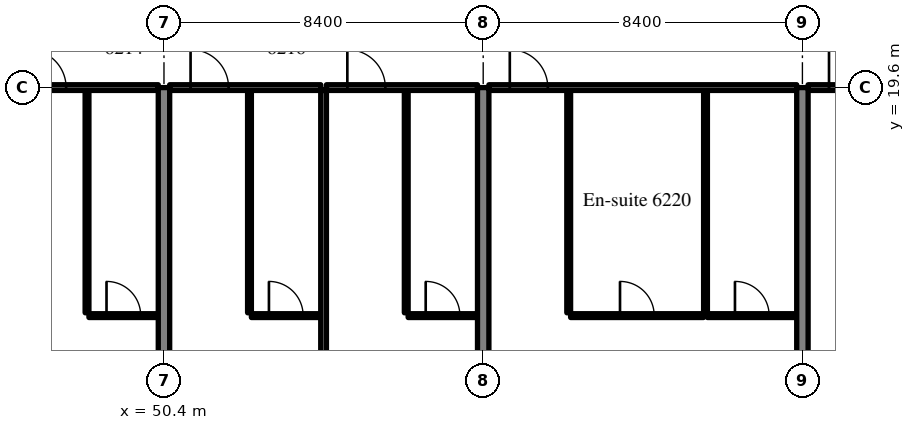
"""IFC4 building model, lengths in metres.
Left out: names, types, materials, properties, quantities, classifications, styles, units other than length and angle.
Written with IfcOpenShell. Run it as: python <this file> out.ifc"""

import sys

from ifc_helpers import new_model, si_unit, direction, frame, frame_2d, origin, place, context, subcontext, project, spatial, rectangle, extrude, source, transform, mapped, element, fill, save


model = new_model("IFC4")
c1 = context("Model", 3, precision=1e-05, world=origin(), true_north=direction((0.0, 1.0)))
c2 = subcontext(c1, "Body", "Model", "MODEL_VIEW")
j1 = project(units=[si_unit("LENGTHUNIT", "METRE"), si_unit("PLANEANGLEUNIT", "RADIAN")], contexts=[c1])
p1 = place(None, origin())
s1 = spatial("IfcSite", under=j1, at=p1, CompositionType="ELEMENT")
p2 = place(p1, origin())
s2 = spatial("IfcBuilding", under=s1, at=p2, CompositionType="ELEMENT")
p3 = place(p2, frame((0.0, 0.0, 256.9)))
s3 = spatial("IfcBuildingStorey", under=s2, at=p3, CompositionType="ELEMENT", Elevation=256.9)
m1 = source(origin(), c2, "Body", "SweptSolid", [
    extrude(rectangle(XDim=13.1, YDim=0.3, at=frame_2d((6.55, 0.0))), origin(), (0.0, 0.0, 1.0), 3.62),
])
p4 = place(p3, frame((50.4, 6.5, 0.0), z_axis=(0.0, 0.0, 1.0), x_axis=(0.0, 1.0, 0.0)))
e1 = element("IfcWall", 1, at=p4, inside=s3, PredefinedType="SHEAR", context=c2, shape_type="MappedRepresentation", body=[
    mapped(m1, transform((0.0, 0.0, 0.0), scale=1.0)),
])
m2 = source(origin(), c2, "Body", "SweptSolid", [
    extrude(rectangle(XDim=14.1, YDim=0.3, at=frame_2d((7.05, 0.0))), origin(), (0.0, 0.0, 1.0), 3.62),
])
for number, where, z_axis, x_axis in (
    (2, (58.8, 5.5, 0.0), (0.0, 0.0, 1.0), (0.0, 1.0, 0.0)),
    (3, (67.2, 5.5, 0.0), (0.0, 0.0, 1.0), (0.0, 1.0, 0.0)),
):
    element("IfcWall", number, at=place(p3, frame(where, z_axis=z_axis, x_axis=x_axis)), inside=s3, PredefinedType="SHEAR", context=c2, shape_type="MappedRepresentation", body=[
        mapped(m2, transform((0.0, 0.0, 0.0), scale=1.0)),
    ])
m3 = source(origin(), c2, "Body", "SweptSolid", [
    extrude(rectangle(XDim=5.85, YDim=0.1, at=frame_2d((2.925, 0.0))), origin(), (0.0, 0.0, 1.0), 3.62),
])
p5 = place(p3, frame((48.375, 13.675, 0.0), z_axis=(0.0, 0.0, 1.0), x_axis=(0.0, 1.0, 0.0)))
e4 = element("IfcWall", 4, at=p5, inside=s3, PredefinedType="PARTITIONING", context=c2, shape_type="MappedRepresentation", body=[
    mapped(m3, transform((0.0, 0.0, 0.0), scale=1.0)),
])
m4 = source(origin(), c2, "Body", "SweptSolid", [
    extrude(rectangle(XDim=1.825, YDim=0.1, at=frame_2d((0.913, 0.0))), origin(), (0.0, 0.0, 1.0), 3.62),
])
p6 = place(p3, frame((48.425, 13.6, 0.0), z_axis=(0.0, 0.0, 1.0), x_axis=(1.0, 0.0, 0.0)))
e5 = element("IfcWall", 5, at=p6, inside=s3, PredefinedType="PARTITIONING", context=c2, shape_type="MappedRepresentation", body=[
    mapped(m4, transform((0.0, 0.0, 0.0), scale=1.0)),
])
m5 = source(origin(), c2, "Body", "SweptSolid", [
    extrude(rectangle(XDim=0.9, YDim=2.1, at=frame_2d((0.45, 1.05))), frame((0.0, 0.06, 0.0), z_axis=(0.0, -1.0, 0.0), x_axis=(1.0, 0.0, 0.0)), (0.0, 0.0, 1.0), 0.12),
])
p7 = place(p6, frame((0.463, 0.0, 0.0)))
e6 = element("IfcOpeningElement", 6, at=p7, cuts=e5, PredefinedType="OPENING", context=c2, shape_type="MappedRepresentation", body=[
    mapped(m5, transform((0.0, 0.0, 0.0), scale=1.0)),
])
m6 = source(origin(), c2, "Body", "SweptSolid", [
    extrude(rectangle(XDim=3.975, YDim=0.15, at=frame_2d((1.988, 0.0))), origin(), (0.0, 0.0, 1.0), 2.92),
])
p8 = place(p3, frame((46.275, 19.6, 0.0), z_axis=(0.0, 0.0, 1.0), x_axis=(1.0, 0.0, 0.0)))
e7 = element("IfcWall", 7, at=p8, inside=s3, PredefinedType="PARTITIONING", context=c2, shape_type="MappedRepresentation", body=[
    mapped(m6, transform((0.0, 0.0, 0.0), scale=1.0)),
])
m7 = source(origin(), c2, "Body", "SweptSolid", [
    extrude(rectangle(XDim=1.0, YDim=2.1, at=frame_2d((0.5, 1.05))), frame((0.0, 0.085, 0.0), z_axis=(0.0, -1.0, 0.0), x_axis=(1.0, 0.0, 0.0)), (0.0, 0.0, 1.0), 0.17),
])
p9 = place(p8, frame((0.55, 0.0, 0.0)))
e8 = element("IfcOpeningElement", 8, at=p9, cuts=e7, PredefinedType="OPENING", context=c2, shape_type="MappedRepresentation", body=[
    mapped(m7, transform((0.0, 0.0, 0.0), scale=1.0)),
])
p10 = place(p3, frame((52.65, 13.675, 0.0), z_axis=(0.0, 0.0, 1.0), x_axis=(0.0, 1.0, 0.0)))
e9 = element("IfcWall", 9, at=p10, inside=s3, PredefinedType="PARTITIONING", context=c2, shape_type="MappedRepresentation", body=[
    mapped(m3, transform((0.0, 0.0, 0.0), scale=1.0)),
])
p11 = place(p3, frame((52.7, 13.6, 0.0), z_axis=(0.0, 0.0, 1.0), x_axis=(1.0, 0.0, 0.0)))
e10 = element("IfcWall", 10, at=p11, inside=s3, PredefinedType="PARTITIONING", context=c2, shape_type="MappedRepresentation", body=[
    mapped(m4, transform((0.0, 0.0, 0.0), scale=1.0)),
])
p12 = place(p11, frame((0.462, 0.0, 0.0)))
e11 = element("IfcOpeningElement", 11, at=p12, cuts=e10, PredefinedType="OPENING", context=c2, shape_type="MappedRepresentation", body=[
    mapped(m5, transform((0.0, 0.0, 0.0), scale=1.0)),
])
m8 = source(origin(), c2, "Body", "SweptSolid", [
    extrude(rectangle(XDim=3.975, YDim=0.15, at=frame_2d((1.987, 0.0))), origin(), (0.0, 0.0, 1.0), 2.92),
])
p13 = place(p3, frame((50.55, 19.6, 0.0), z_axis=(0.0, 0.0, 1.0), x_axis=(1.0, 0.0, 0.0)))
e12 = element("IfcWall", 12, at=p13, inside=s3, PredefinedType="PARTITIONING", context=c2, shape_type="MappedRepresentation", body=[
    mapped(m8, transform((0.0, 0.0, 0.0), scale=1.0)),
])
p14 = place(p13, frame((0.55, 0.0, 0.0)))
e13 = element("IfcOpeningElement", 13, at=p14, cuts=e12, PredefinedType="OPENING", context=c2, shape_type="MappedRepresentation", body=[
    mapped(m7, transform((0.0, 0.0, 0.0), scale=1.0)),
])
p15 = place(p3, frame((56.775, 13.675, 0.0), z_axis=(0.0, 0.0, 1.0), x_axis=(0.0, 1.0, 0.0)))
e14 = element("IfcWall", 14, at=p15, inside=s3, PredefinedType="PARTITIONING", context=c2, shape_type="MappedRepresentation", body=[
    mapped(m3, transform((0.0, 0.0, 0.0), scale=1.0)),
])
p16 = place(p3, frame((56.825, 13.6, 0.0), z_axis=(0.0, 0.0, 1.0), x_axis=(1.0, 0.0, 0.0)))
e15 = element("IfcWall", 15, at=p16, inside=s3, PredefinedType="PARTITIONING", context=c2, shape_type="MappedRepresentation", body=[
    mapped(m4, transform((0.0, 0.0, 0.0), scale=1.0)),
])
p17 = place(p16, frame((0.462, 0.0, 0.0)))
e16 = element("IfcOpeningElement", 16, at=p17, cuts=e15, PredefinedType="OPENING", context=c2, shape_type="MappedRepresentation", body=[
    mapped(m5, transform((0.0, 0.0, 0.0), scale=1.0)),
])
p18 = place(p3, frame((54.675, 19.6, 0.0), z_axis=(0.0, 0.0, 1.0), x_axis=(1.0, 0.0, 0.0)))
e17 = element("IfcWall", 17, at=p18, inside=s3, PredefinedType="PARTITIONING", context=c2, shape_type="MappedRepresentation", body=[
    mapped(m8, transform((0.0, 0.0, 0.0), scale=1.0)),
])
p19 = place(p18, frame((0.55, 0.0, 0.0)))
e18 = element("IfcOpeningElement", 18, at=p19, cuts=e17, PredefinedType="OPENING", context=c2, shape_type="MappedRepresentation", body=[
    mapped(m7, transform((0.0, 0.0, 0.0), scale=1.0)),
])
m9 = source(origin(), c2, "Body", "SweptSolid", [
    extrude(rectangle(XDim=14.906, YDim=0.15, at=frame_2d((7.453, 0.0))), origin(), (0.0, 0.0, 1.0), 3.62),
])
p20 = place(p3, frame((54.6, 4.619, 0.0), z_axis=(0.0, 0.0, 1.0), x_axis=(0.0, 1.0, 0.0)))
e19 = element("IfcWall", 19, at=p20, inside=s3, PredefinedType="PARTITIONING", context=c2, shape_type="MappedRepresentation", body=[
    mapped(m9, transform((0.0, 0.0, 0.0), scale=1.0)),
])
for number, where, z_axis, x_axis in (
    (20, (61.05, 13.675, 0.0), (0.0, 0.0, 1.0), (0.0, 1.0, 0.0)),
    (21, (64.65, 13.675, 0.0), (0.0, 0.0, 1.0), (0.0, 1.0, 0.0)),
):
    element("IfcWall", number, at=place(p3, frame(where, z_axis=z_axis, x_axis=x_axis)), inside=s3, PredefinedType="PARTITIONING", context=c2, shape_type="MappedRepresentation", body=[
        mapped(m3, transform((0.0, 0.0, 0.0), scale=1.0)),
    ])
m10 = source(origin(), c2, "Body", "SweptSolid", [
    extrude(rectangle(XDim=3.5, YDim=0.1, at=frame_2d((1.75, 0.0))), origin(), (0.0, 0.0, 1.0), 3.62),
])
p21 = place(p3, frame((61.1, 13.6, 0.0), z_axis=(0.0, 0.0, 1.0), x_axis=(1.0, 0.0, 0.0)))
e22 = element("IfcWall", 22, at=p21, inside=s3, PredefinedType="PARTITIONING", context=c2, shape_type="MappedRepresentation", body=[
    mapped(m10, transform((0.0, 0.0, 0.0), scale=1.0)),
])
p22 = place(p21, frame((1.3, 0.0, 0.0)))
e23 = element("IfcOpeningElement", 23, at=p22, cuts=e22, PredefinedType="OPENING", context=c2, shape_type="MappedRepresentation", body=[
    mapped(m5, transform((0.0, 0.0, 0.0), scale=1.0)),
])
m11 = source(origin(), c2, "Body", "SweptSolid", [
    extrude(rectangle(XDim=2.35, YDim=0.1, at=frame_2d((1.175, 0.0))), origin(), (0.0, 0.0, 1.0), 3.62),
])
p23 = place(p3, frame((64.7, 13.6, 0.0), z_axis=(0.0, 0.0, 1.0), x_axis=(1.0, 0.0, 0.0)))
e24 = element("IfcWall", 24, at=p23, inside=s3, PredefinedType="PARTITIONING", context=c2, shape_type="MappedRepresentation", body=[
    mapped(m11, transform((0.0, 0.0, 0.0), scale=1.0)),
])
p24 = place(p23, frame((0.725, 0.0, 0.0)))
e25 = element("IfcOpeningElement", 25, at=p24, cuts=e24, PredefinedType="OPENING", context=c2, shape_type="MappedRepresentation", body=[
    mapped(m5, transform((0.0, 0.0, 0.0), scale=1.0)),
])
m12 = source(origin(), c2, "Body", "SweptSolid", [
    extrude(rectangle(XDim=8.1, YDim=0.15, at=frame_2d((4.05, 0.0))), origin(), (0.0, 0.0, 1.0), 2.92),
])
p25 = place(p3, frame((58.95, 19.6, 0.0), z_axis=(0.0, 0.0, 1.0), x_axis=(1.0, 0.0, 0.0)))
e26 = element("IfcWall", 26, at=p25, inside=s3, PredefinedType="PARTITIONING", context=c2, shape_type="MappedRepresentation", body=[
    mapped(m12, transform((0.0, 0.0, 0.0), scale=1.0)),
])
p26 = place(p25, frame((0.55, 0.0, 0.0)))
e27 = element("IfcOpeningElement", 27, at=p26, cuts=e26, PredefinedType="OPENING", context=c2, shape_type="MappedRepresentation", body=[
    mapped(m7, transform((0.0, 0.0, 0.0), scale=1.0)),
])
m13 = source(origin(), c2, "Body", "SweptSolid", [
    extrude(rectangle(XDim=8.1, YDim=0.15, at=frame_2d((4.05, 0.0))), origin(), (0.0, 0.0, 1.0), 2.92),
])
p27 = place(p3, frame((67.35, 19.6, 0.0), z_axis=(0.0, 0.0, 1.0), x_axis=(1.0, 0.0, 0.0)))
e28 = element("IfcWall", 28, at=p27, inside=s3, PredefinedType="PARTITIONING", context=c2, shape_type="MappedRepresentation", body=[
    mapped(m13, transform((0.0, 0.0, 0.0), scale=1.0)),
])
p28 = place(p27, frame((0.55, 0.0, 0.0)))
e29 = element("IfcOpeningElement", 29, at=p28, cuts=e28, PredefinedType="OPENING", context=c2, shape_type="MappedRepresentation", body=[
    mapped(m7, transform((0.0, 0.0, 0.0), scale=1.0)),
])
m14 = source(origin(), c2, "Body", "SweptSolid", [
    extrude(rectangle(XDim=0.9, YDim=2.1, at=frame_2d((0.45, 1.05))), frame((0.0, 0.025, 0.0), z_axis=(0.0, -1.0, 0.0), x_axis=(1.0, 0.0, 0.0)), (0.0, 0.0, 1.0), 0.05),
])
p29 = place(p7, origin())
e30 = element("IfcDoor", 30, at=p29, inside=s3, OperationType="SINGLE_SWING_LEFT", PredefinedType="DOOR", context=c2, shape_type="MappedRepresentation", body=[
    mapped(m14, transform((0.0, 0.0, 0.0), scale=1.0)),
])
fill(e6, e30)
m15 = source(origin(), c2, "Body", "SweptSolid", [
    extrude(rectangle(XDim=1.0, YDim=2.1, at=frame_2d((0.5, 1.05))), frame((0.0, 0.025, 0.0), z_axis=(0.0, -1.0, 0.0), x_axis=(1.0, 0.0, 0.0)), (0.0, 0.0, 1.0), 0.05),
])
p30 = place(p9, origin())
e31 = element("IfcDoor", 31, at=p30, inside=s3, OperationType="SINGLE_SWING_LEFT", PredefinedType="DOOR", context=c2, shape_type="MappedRepresentation", body=[
    mapped(m15, transform((0.0, 0.0, 0.0), scale=1.0)),
])
fill(e8, e31)
p31 = place(p12, origin())
e32 = element("IfcDoor", 32, at=p31, inside=s3, OperationType="SINGLE_SWING_LEFT", PredefinedType="DOOR", context=c2, shape_type="MappedRepresentation", body=[
    mapped(m14, transform((0.0, 0.0, 0.0), scale=1.0)),
])
fill(e11, e32)
p32 = place(p14, origin())
e33 = element("IfcDoor", 33, at=p32, inside=s3, OperationType="SINGLE_SWING_LEFT", PredefinedType="DOOR", context=c2, shape_type="MappedRepresentation", body=[
    mapped(m15, transform((0.0, 0.0, 0.0), scale=1.0)),
])
fill(e13, e33)
p33 = place(p17, origin())
e34 = element("IfcDoor", 34, at=p33, inside=s3, OperationType="SINGLE_SWING_LEFT", PredefinedType="DOOR", context=c2, shape_type="MappedRepresentation", body=[
    mapped(m14, transform((0.0, 0.0, 0.0), scale=1.0)),
])
fill(e16, e34)
p34 = place(p19, origin())
e35 = element("IfcDoor", 35, at=p34, inside=s3, OperationType="SINGLE_SWING_LEFT", PredefinedType="DOOR", context=c2, shape_type="MappedRepresentation", body=[
    mapped(m15, transform((0.0, 0.0, 0.0), scale=1.0)),
])
fill(e18, e35)
p35 = place(p22, origin())
e36 = element("IfcDoor", 36, at=p35, inside=s3, OperationType="SINGLE_SWING_LEFT", PredefinedType="DOOR", context=c2, shape_type="MappedRepresentation", body=[
    mapped(m14, transform((0.0, 0.0, 0.0), scale=1.0)),
])
fill(e23, e36)
p36 = place(p24, origin())
e37 = element("IfcDoor", 37, at=p36, inside=s3, OperationType="SINGLE_SWING_LEFT", PredefinedType="DOOR", context=c2, shape_type="MappedRepresentation", body=[
    mapped(m14, transform((0.0, 0.0, 0.0), scale=1.0)),
])
fill(e25, e37)
p37 = place(p26, origin())
e38 = element("IfcDoor", 38, at=p37, inside=s3, OperationType="SINGLE_SWING_LEFT", PredefinedType="DOOR", context=c2, shape_type="MappedRepresentation", body=[
    mapped(m15, transform((0.0, 0.0, 0.0), scale=1.0)),
])
fill(e27, e38)
p38 = place(p28, origin())
e39 = element("IfcDoor", 39, at=p38, inside=s3, OperationType="SINGLE_SWING_LEFT", PredefinedType="DOOR", context=c2, shape_type="MappedRepresentation", body=[
    mapped(m15, transform((0.0, 0.0, 0.0), scale=1.0)),
])
fill(e29, e39)
save(model, sys.argv[1])
